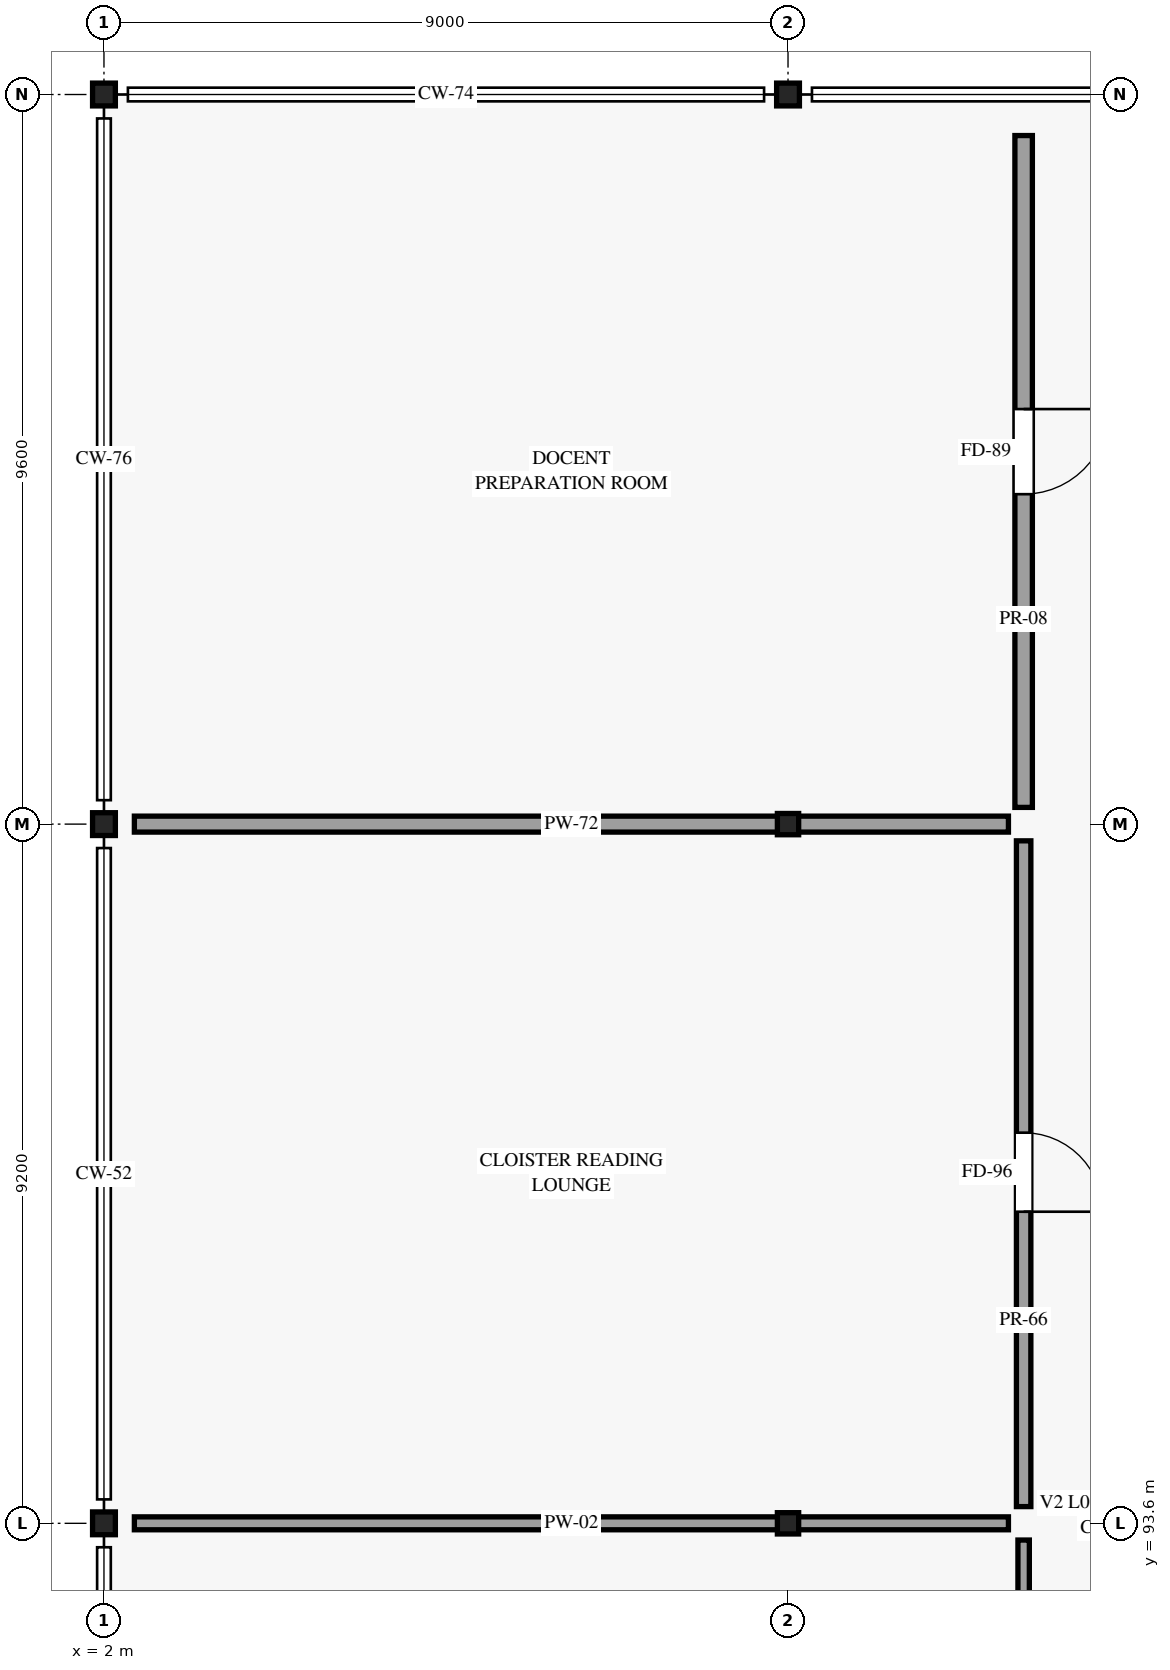
"""IFC4 building model, lengths in metres.
Left out: names, types, materials, properties, quantities, classifications, styles, units other than length and angle.
Written with IfcOpenShell. Run it as: python <this file> out.ifc"""

import sys

from ifc_helpers import new_model, si_unit, direction, frame, frame_2d, origin, origin_2d, place, context, subcontext, project, spatial, rectangle, i_section, extrude, element, fill, save


model = new_model("IFC4")
c1 = context("Model", 3, precision=1e-05, world=origin(), true_north=direction((0.0, 1.0)))
c2 = subcontext(c1, "Body", "Model", "MODEL_VIEW")
j1 = project(units=[si_unit("LENGTHUNIT", "METRE"), si_unit("PLANEANGLEUNIT", "RADIAN")], contexts=[c1])
p1 = place(None, origin())
s1 = spatial("IfcSite", under=j1, at=p1, CompositionType="ELEMENT")
p2 = place(p1, origin())
s2 = spatial("IfcBuilding", under=s1, at=p2, CompositionType="ELEMENT")
p3 = place(p2, frame((0.0, 0.0, 5.4)))
s3 = spatial("IfcBuildingStorey", under=s2, at=p3, CompositionType="ELEMENT", Elevation=5.4)
for number, where, z_axis, x_axis in (
    (1, (2.0, 93.6, 0.0), (0.0, 0.0, 1.0), (1.0, 0.0, 0.0)),
    (2, (2.0, 102.8, 0.0), (0.0, 0.0, 1.0), (1.0, 0.0, 0.0)),
    (3, (2.0, 112.4, 0.0), (0.0, 0.0, 1.0), (1.0, 0.0, 0.0)),
):
    element("IfcColumn", number, at=place(p3, frame(where, z_axis=z_axis, x_axis=x_axis)), inside=s3, PredefinedType="COLUMN", context=c2, shape_type="SweptSolid", body=[
        extrude(i_section(OverallWidth=0.3, OverallDepth=0.3, WebThickness=0.011, FlangeThickness=0.019, FilletRadius=0.027, at=origin_2d()), origin(), (0.0, 0.0, 1.0), 4.8),
    ])
for number, where, z_axis, x_axis in (
    (4, (11.0, 93.6, 0.0), (0.0, 0.0, 1.0), (1.0, 0.0, 0.0)),
    (5, (11.0, 102.8, 0.0), (0.0, 0.0, 1.0), (1.0, 0.0, 0.0)),
):
    element("IfcColumn", number, at=place(p3, frame(where, z_axis=z_axis, x_axis=x_axis)), inside=s3, PredefinedType="COLUMN", context=c2, shape_type="SweptSolid", body=[
        extrude(i_section(OverallWidth=0.28, OverallDepth=0.28, WebThickness=0.01, FlangeThickness=0.018, FilletRadius=0.024, at=origin_2d()), origin(), (0.0, 0.0, 1.0), 4.8),
    ])
p4 = place(p3, frame((11.0, 112.4, 0.0), z_axis=(0.0, 0.0, 1.0), x_axis=(1.0, 0.0, 0.0)))
e6 = element("IfcColumn", 6, at=p4, inside=s3, PredefinedType="COLUMN", context=c2, shape_type="SweptSolid", body=[
    extrude(i_section(OverallWidth=0.3, OverallDepth=0.3, WebThickness=0.011, FlangeThickness=0.019, FilletRadius=0.027, at=origin_2d()), origin(), (0.0, 0.0, 1.0), 4.8),
])
p5 = place(p3, frame((14.1, 75.42, 0.0), z_axis=(0.0, 0.0, 1.0), x_axis=(0.0, 1.0, 0.0)))
e7 = element("IfcWall", 7, at=p5, inside=s3, PredefinedType="PARTITIONING", context=c2, shape_type="SweptSolid", body=[
    extrude(rectangle(XDim=17.96, YDim=0.15, at=frame_2d((8.98, 0.0))), origin(), (0.0, 0.0, 1.0), 4.095),
])
p6 = place(p5, frame((5.213, 0.0, 0.0), z_axis=(0.0, 0.0, 1.0), x_axis=(-1.0, 0.0, 0.0)))
e8 = element("IfcOpeningElement", 8, at=p6, cuts=e7, PredefinedType="OPENING", context=c2, shape_type="SweptSolid", body=[
    extrude(rectangle(XDim=1.5, YDim=2.35, at=frame_2d((0.75, 1.175))), frame((0.0, 0.085, 0.0), z_axis=(0.0, -1.0, 0.0), x_axis=(1.0, 0.0, 0.0)), (0.0, 0.0, 1.0), 0.17),
])
p7 = place(p3, frame((2.4, 93.6, 0.0), z_axis=(0.0, 0.0, 1.0), x_axis=(1.0, 0.0, 0.0)))
e9 = element("IfcWall", 9, at=p7, inside=s3, PredefinedType="PARTITIONING", context=c2, shape_type="SweptSolid", body=[
    extrude(rectangle(XDim=11.5, YDim=0.17, at=frame_2d((5.75, 0.0))), origin(), (0.0, 0.0, 1.0), 4.095),
])
p8 = place(p3, frame((14.1, 93.82, 0.0), z_axis=(0.0, 0.0, 1.0), x_axis=(0.0, 1.0, 0.0)))
e10 = element("IfcWall", 10, at=p8, inside=s3, PredefinedType="PARTITIONING", context=c2, shape_type="SweptSolid", body=[
    extrude(rectangle(XDim=8.76, YDim=0.19, at=frame_2d((4.38, 0.0))), origin(), (0.0, 0.0, 1.0), 4.095),
])
p9 = place(p8, frame((4.92, 0.0, 0.0), z_axis=(0.0, 0.0, 1.0), x_axis=(-1.0, 0.0, 0.0)))
e11 = element("IfcOpeningElement", 11, at=p9, cuts=e10, PredefinedType="OPENING", context=c2, shape_type="SweptSolid", body=[
    extrude(rectangle(XDim=1.04, YDim=2.22, at=frame_2d((0.52, 1.11))), frame((0.0, 0.105, 0.0), z_axis=(0.0, -1.0, 0.0), x_axis=(1.0, 0.0, 0.0)), (0.0, 0.0, 1.0), 0.21),
])
p10 = place(p3, frame((2.4, 102.8, 0.0), z_axis=(0.0, 0.0, 1.0), x_axis=(1.0, 0.0, 0.0)))
e12 = element("IfcWall", 12, at=p10, inside=s3, PredefinedType="PARTITIONING", context=c2, shape_type="SweptSolid", body=[
    extrude(rectangle(XDim=11.5, YDim=0.21, at=frame_2d((5.75, 0.0))), origin(), (0.0, 0.0, 1.0), 4.095),
])
p11 = place(p3, frame((14.1, 103.02, 0.0), z_axis=(0.0, 0.0, 1.0), x_axis=(0.0, 1.0, 0.0)))
e13 = element("IfcWall", 13, at=p11, inside=s3, PredefinedType="PARTITIONING", context=c2, shape_type="SweptSolid", body=[
    extrude(rectangle(XDim=8.84, YDim=0.23, at=frame_2d((4.42, 0.0))), origin(), (0.0, 0.0, 1.0), 4.095),
])
p12 = place(p11, frame((5.241, 0.0, 0.0), z_axis=(0.0, 0.0, 1.0), x_axis=(-1.0, 0.0, 0.0)))
e14 = element("IfcOpeningElement", 14, at=p12, cuts=e13, PredefinedType="OPENING", context=c2, shape_type="SweptSolid", body=[
    extrude(rectangle(XDim=1.12, YDim=2.26, at=frame_2d((0.56, 1.13))), frame((0.0, 0.125, 0.0), z_axis=(0.0, -1.0, 0.0), x_axis=(1.0, 0.0, 0.0)), (0.0, 0.0, 1.0), 0.25),
])
p13 = place(p9, origin())
e15 = element("IfcDoor", 15, at=p13, inside=s3, OperationType="SINGLE_SWING_RIGHT", PredefinedType="DOOR", context=c2, shape_type="SweptSolid", body=[
    extrude(rectangle(XDim=1.04, YDim=2.22, at=frame_2d((0.52, 1.11))), frame((0.0, 0.025, 0.0), z_axis=(0.0, -1.0, 0.0), x_axis=(1.0, 0.0, 0.0)), (0.0, 0.0, 1.0), 0.05),
])
fill(e11, e15)
p14 = place(p12, origin())
e16 = element("IfcDoor", 16, at=p14, inside=s3, OperationType="SINGLE_SWING_LEFT", PredefinedType="DOOR", context=c2, shape_type="SweptSolid", body=[
    extrude(rectangle(XDim=1.12, YDim=2.26, at=frame_2d((0.56, 1.13))), frame((0.0, 0.025, 0.0), z_axis=(0.0, -1.0, 0.0), x_axis=(1.0, 0.0, 0.0)), (0.0, 0.0, 1.0), 0.05),
])
fill(e14, e16)
save(model, sys.argv[1])
